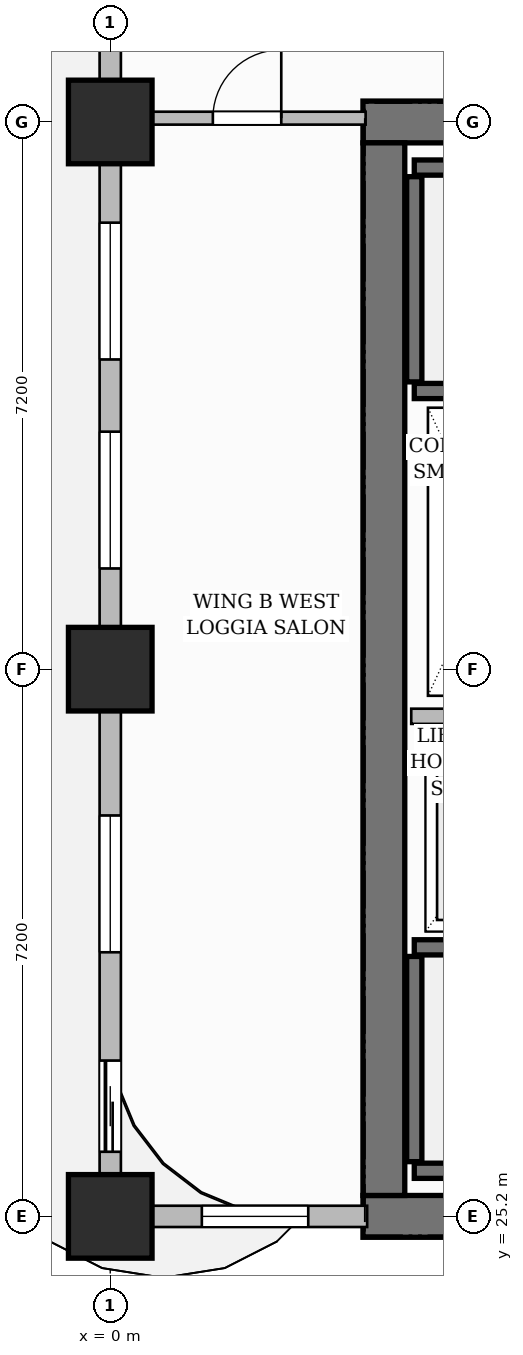
"""IFC4 building model, lengths in metres.
Left out: names, types, materials, properties, quantities, classifications, styles, units other than length and angle.
Written with IfcOpenShell. Run it as: python <this file> out.ifc"""

import sys

from ifc_helpers import new_model, si_unit, direction, frame, frame_2d, origin, origin_2d, place, context, subcontext, project, spatial, rectangle, extrude, source, transform, mapped, element, fill, save


model = new_model("IFC4")
c1 = context("Model", 3, precision=1e-05, world=origin(), true_north=direction((0.0, 1.0)))
c2 = subcontext(c1, "Body", "Model", "MODEL_VIEW")
j1 = project(units=[si_unit("LENGTHUNIT", "METRE"), si_unit("PLANEANGLEUNIT", "RADIAN")], contexts=[c1])
p1 = place(None, origin())
s1 = spatial("IfcSite", under=j1, at=p1, CompositionType="ELEMENT")
p2 = place(p1, origin())
s2 = spatial("IfcBuilding", under=s1, at=p2, CompositionType="ELEMENT")
p3 = place(p2, frame((0.0, 0.0, 73.1)))
s3 = spatial("IfcBuildingStorey", under=s2, at=p3, CompositionType="ELEMENT", Elevation=73.1)
for number, where, z_axis, x_axis in (
    (1, (3.325, 25.2, 0.0), (0.0, 0.0, 1.0), (1.0, 0.0, 0.0)),
    (2, (3.325, 39.6, 0.0), (0.0, 0.0, 1.0), (1.0, 0.0, 0.0)),
):
    element("IfcWall", number, at=place(p3, frame(where, z_axis=z_axis, x_axis=x_axis)), inside=s3, PredefinedType="SHEAR", context=c2, shape_type="SweptSolid", body=[
        extrude(rectangle(XDim=8.35, YDim=0.55, at=frame_2d((4.175, 0.0))), origin(), (0.0, 0.0, 1.0), 3.7),
    ])
p4 = place(p3, frame((3.6, 25.475, 0.0), z_axis=(0.0, 0.0, 1.0), x_axis=(0.0, 1.0, 0.0)))
e3 = element("IfcWall", 3, at=p4, inside=s3, PredefinedType="SHEAR", context=c2, shape_type="SweptSolid", body=[
    extrude(rectangle(XDim=13.85, YDim=0.55, at=frame_2d((6.925, 0.0))), origin(), (0.0, 0.0, 1.0), 3.7),
])
m1 = source(origin(), c2, "Body", "SweptSolid", [
    extrude(rectangle(XDim=1.1, YDim=1.1, at=origin_2d()), origin(), (0.0, 0.0, 1.0), 3.7),
])
for number, where, z_axis, x_axis in (
    (4, (0.0, 25.2, 0.0), (0.0, 0.0, 1.0), (1.0, 0.0, 0.0)),
    (5, (0.0, 32.4, 0.0), (0.0, 0.0, 1.0), (1.0, 0.0, 0.0)),
    (6, (0.0, 39.6, 0.0), (0.0, 0.0, 1.0), (1.0, 0.0, 0.0)),
):
    element("IfcColumn", number, at=place(p3, frame(where, z_axis=z_axis, x_axis=x_axis)), inside=s3, PredefinedType="COLUMN", context=c2, shape_type="MappedRepresentation", body=[
        mapped(m1, transform((0.0, 0.0, 0.0), scale=1.0)),
    ])
p5 = place(p3, frame((4.0, 25.8, 0.0), z_axis=(0.0, 0.0, 1.0), x_axis=(1.0, 0.0, 0.0)))
e7 = element("IfcWall", 7, at=p5, inside=s3, PredefinedType="SHEAR", context=c2, shape_type="SweptSolid", body=[
    extrude(rectangle(XDim=7.1, YDim=0.2, at=frame_2d((3.55, 0.0))), origin(), (0.0, 0.0, 1.0), 3.7),
])
p6 = place(p3, frame((4.0, 25.92, 0.0), z_axis=(0.0, 0.0, 1.0), x_axis=(0.0, 1.0, 0.0)))
e8 = element("IfcWall", 8, at=p6, inside=s3, PredefinedType="SHEAR", context=c2, shape_type="SweptSolid", body=[
    extrude(rectangle(XDim=2.7, YDim=0.2, at=frame_2d((1.35, 0.0))), origin(), (0.0, 0.0, 1.0), 3.7),
])
p7 = place(p3, frame((4.0, 28.74, 0.0), z_axis=(0.0, 0.0, 1.0), x_axis=(1.0, 0.0, 0.0)))
e9 = element("IfcWall", 9, at=p7, inside=s3, PredefinedType="SHEAR", context=c2, shape_type="SweptSolid", body=[
    extrude(rectangle(XDim=7.1, YDim=0.2, at=frame_2d((3.55, 0.0))), origin(), (0.0, 0.0, 1.0), 3.7),
])
p8 = place(p7, frame((5.815, 0.0, 0.0)))
e10 = element("IfcOpeningElement", 10, at=p8, cuts=e9, PredefinedType="OPENING", context=c2, shape_type="SweptSolid", body=[
    extrude(rectangle(XDim=1.05, YDim=2.2, at=frame_2d((0.525, 1.1))), frame((0.0, 0.11, 0.0), z_axis=(0.0, -1.0, 0.0), x_axis=(1.0, 0.0, 0.0)), (0.0, 0.0, 1.0), 0.22),
])
p9 = place(p3, frame((4.0, 39.0, 0.0), z_axis=(0.0, 0.0, 1.0), x_axis=(1.0, 0.0, 0.0)))
e11 = element("IfcWall", 11, at=p9, inside=s3, PredefinedType="SHEAR", context=c2, shape_type="SweptSolid", body=[
    extrude(rectangle(XDim=7.1, YDim=0.2, at=frame_2d((3.55, 0.0))), origin(), (0.0, 0.0, 1.0), 3.7),
])
p10 = place(p3, frame((4.0, 36.18, 0.0), z_axis=(0.0, 0.0, 1.0), x_axis=(0.0, 1.0, 0.0)))
e12 = element("IfcWall", 12, at=p10, inside=s3, PredefinedType="SHEAR", context=c2, shape_type="SweptSolid", body=[
    extrude(rectangle(XDim=2.7, YDim=0.2, at=frame_2d((1.35, 0.0))), origin(), (0.0, 0.0, 1.0), 3.7),
])
p11 = place(p3, frame((4.0, 36.06, 0.0), z_axis=(0.0, 0.0, 1.0), x_axis=(1.0, 0.0, 0.0)))
e13 = element("IfcWall", 13, at=p11, inside=s3, PredefinedType="SHEAR", context=c2, shape_type="SweptSolid", body=[
    extrude(rectangle(XDim=7.1, YDim=0.2, at=frame_2d((3.55, 0.0))), origin(), (0.0, 0.0, 1.0), 3.7),
])
p12 = place(p11, frame((5.815, 0.0, 0.0)))
e14 = element("IfcOpeningElement", 14, at=p12, cuts=e13, PredefinedType="OPENING", context=c2, shape_type="SweptSolid", body=[
    extrude(rectangle(XDim=1.05, YDim=2.2, at=frame_2d((0.525, 1.1))), frame((0.0, 0.11, 0.0), z_axis=(0.0, -1.0, 0.0), x_axis=(1.0, 0.0, 0.0)), (0.0, 0.0, 1.0), 0.22),
])
p13 = place(p3, frame((3.96, 31.78, 0.0), z_axis=(0.0, 0.0, 1.0), x_axis=(1.0, 0.0, 0.0)))
e15 = element("IfcWall", 15, at=p13, inside=s3, PredefinedType="PARTITIONING", context=c2, shape_type="SweptSolid", body=[
    extrude(rectangle(XDim=2.13, YDim=0.2, at=frame_2d((1.065, 0.0))), origin(), (0.0, 0.0, 1.0), 3.45),
])
p14 = place(p3, frame((0.24, 39.65, 0.0), z_axis=(0.0, 0.0, 1.0), x_axis=(1.0, 0.0, 0.0)))
e16 = element("IfcWall", 16, at=p14, inside=s3, PredefinedType="PARTITIONING", context=c2, shape_type="SweptSolid", body=[
    extrude(rectangle(XDim=3.12, YDim=0.17, at=frame_2d((1.56, 0.0))), origin(), (0.0, 0.0, 1.0), 3.45),
])
p15 = place(p14, frame((1.11, 0.0, 0.0)))
e17 = element("IfcOpeningElement", 17, at=p15, cuts=e16, PredefinedType="OPENING", context=c2, shape_type="SweptSolid", body=[
    extrude(rectangle(XDim=0.9, YDim=2.15, at=frame_2d((0.45, 1.075))), frame((0.0, 0.095, 0.0), z_axis=(0.0, -1.0, 0.0), x_axis=(1.0, 0.0, 0.0)), (0.0, 0.0, 1.0), 0.19),
])
p16 = place(p3, frame((0.0, 25.2, 0.0), z_axis=(0.0, 0.0, 1.0), x_axis=(1.0, 0.0, 0.0)))
e18 = element("IfcWall", 18, at=p16, inside=s3, PredefinedType="SOLIDWALL", context=c2, shape_type="SweptSolid", body=[
    extrude(rectangle(XDim=3.38, YDim=0.28, at=frame_2d((1.69, 0.0))), origin(), (0.0, 0.0, 1.0), 3.45),
])
p17 = place(p16, frame((1.205, 0.0, 0.8)))
e19 = element("IfcOpeningElement", 19, at=p17, cuts=e18, PredefinedType="OPENING", context=c2, shape_type="SweptSolid", body=[
    extrude(rectangle(XDim=1.4, YDim=1.85, at=frame_2d((0.7, 0.925))), frame((0.0, 0.15, 0.0), z_axis=(0.0, -1.0, 0.0), x_axis=(1.0, 0.0, 0.0)), (0.0, 0.0, 1.0), 0.3),
])
p18 = place(p3, frame((0.0, 25.25, 0.0), z_axis=(0.0, 0.0, 1.0), x_axis=(0.0, 1.0, 0.0)))
e20 = element("IfcWall", 20, at=p18, inside=s3, PredefinedType="SOLIDWALL", context=c2, shape_type="SweptSolid", body=[
    extrude(rectangle(XDim=21.5, YDim=0.28, at=frame_2d((10.75, 0.0))), origin(), (0.0, 0.0, 1.0), 2.885),
])
p19 = place(p18, frame((18.357, 0.0, 0.0)))
e21 = element("IfcOpeningElement", 21, at=p19, cuts=e20, PredefinedType="OPENING", context=c2, shape_type="SweptSolid", body=[
    extrude(rectangle(XDim=1.2, YDim=2.2, at=frame_2d((0.6, 1.1))), frame((0.0, 0.15, 0.0), z_axis=(0.0, -1.0, 0.0), x_axis=(1.0, 0.0, 0.0)), (0.0, 0.0, 1.0), 0.3),
])
p20 = place(p18, frame((0.8, 0.0, 0.0)))
e22 = element("IfcOpeningElement", 22, at=p20, cuts=e20, PredefinedType="OPENING", context=c2, shape_type="SweptSolid", body=[
    extrude(rectangle(XDim=1.2, YDim=2.2, at=frame_2d((0.6, 1.1))), frame((0.0, 0.15, 0.0), z_axis=(0.0, -1.0, 0.0), x_axis=(1.0, 0.0, 0.0)), (0.0, 0.0, 1.0), 0.3),
])
p21 = place(p18, frame((3.425, 0.0, 0.8)))
e23 = element("IfcOpeningElement", 23, at=p21, cuts=e20, PredefinedType="OPENING", context=c2, shape_type="SweptSolid", body=[
    extrude(rectangle(XDim=1.8, YDim=1.85, at=frame_2d((0.9, 0.925))), frame((0.0, 0.15, 0.0), z_axis=(0.0, -1.0, 0.0), x_axis=(1.0, 0.0, 0.0)), (0.0, 0.0, 1.0), 0.3),
])
p22 = place(p18, frame((8.475, 0.0, 0.8)))
e24 = element("IfcOpeningElement", 24, at=p22, cuts=e20, PredefinedType="OPENING", context=c2, shape_type="SweptSolid", body=[
    extrude(rectangle(XDim=1.8, YDim=1.85, at=frame_2d((0.9, 0.925))), frame((0.0, 0.15, 0.0), z_axis=(0.0, -1.0, 0.0), x_axis=(1.0, 0.0, 0.0)), (0.0, 0.0, 1.0), 0.3),
])
p23 = place(p18, frame((11.225, 0.0, 0.8)))
e25 = element("IfcOpeningElement", 25, at=p23, cuts=e20, PredefinedType="OPENING", context=c2, shape_type="SweptSolid", body=[
    extrude(rectangle(XDim=1.8, YDim=1.85, at=frame_2d((0.9, 0.925))), frame((0.0, 0.15, 0.0), z_axis=(0.0, -1.0, 0.0), x_axis=(1.0, 0.0, 0.0)), (0.0, 0.0, 1.0), 0.3),
])
p24 = place(p18, frame((16.632, 0.0, 0.8)))
e26 = element("IfcOpeningElement", 26, at=p24, cuts=e20, PredefinedType="OPENING", context=c2, shape_type="SweptSolid", body=[
    extrude(rectangle(XDim=1.15, YDim=1.8, at=frame_2d((0.575, 0.9))), frame((0.0, 0.15, 0.0), z_axis=(0.0, -1.0, 0.0), x_axis=(1.0, 0.0, 0.0)), (0.0, 0.0, 1.0), 0.3),
])
m2 = source(origin(), c2, "Body", "SweptSolid", [
    extrude(rectangle(XDim=0.9, YDim=2.15, at=frame_2d((0.45, 1.075))), frame((0.0, 0.025, 0.0), z_axis=(0.0, -1.0, 0.0), x_axis=(1.0, 0.0, 0.0)), (0.0, 0.0, 1.0), 0.05),
])
p25 = place(p15, origin())
e27 = element("IfcDoor", 27, at=p25, inside=s3, OperationType="SINGLE_SWING_RIGHT", PredefinedType="DOOR", context=c2, shape_type="MappedRepresentation", body=[
    mapped(m2, transform((0.0, 0.0, 0.0), scale=1.0)),
])
fill(e17, e27)
m3 = source(origin(), c2, "Body", "SweptSolid", [
    extrude(rectangle(XDim=1.2, YDim=2.2, at=frame_2d((0.6, 1.1))), frame((0.0, 0.025, 0.0), z_axis=(0.0, -1.0, 0.0), x_axis=(1.0, 0.0, 0.0)), (0.0, 0.0, 1.0), 0.05),
])
p26 = place(p20, origin())
e28 = element("IfcDoor", 28, at=p26, inside=s3, OperationType="SLIDING_TO_LEFT", PredefinedType="DOOR", context=c2, shape_type="MappedRepresentation", body=[
    mapped(m3, transform((0.0, 0.0, 0.0), scale=1.0)),
])
fill(e22, e28)
m4 = source(origin(), c2, "Body", "SweptSolid", [
    extrude(rectangle(XDim=1.4, YDim=1.85, at=frame_2d((0.7, 0.925))), frame((0.0, 0.03, 0.0), z_axis=(0.0, -1.0, 0.0), x_axis=(1.0, 0.0, 0.0)), (0.0, 0.0, 1.0), 0.06),
])
p27 = place(p17, origin())
e29 = element("IfcWindow", 29, at=p27, inside=s3, PartitioningType="SINGLE_PANEL", PredefinedType="WINDOW", context=c2, shape_type="MappedRepresentation", body=[
    mapped(m4, transform((0.0, 0.0, 0.0), scale=1.0)),
])
fill(e19, e29)
m5 = source(origin(), c2, "Body", "SweptSolid", [
    extrude(rectangle(XDim=1.8, YDim=1.85, at=frame_2d((0.9, 0.925))), frame((0.0, 0.03, 0.0), z_axis=(0.0, -1.0, 0.0), x_axis=(1.0, 0.0, 0.0)), (0.0, 0.0, 1.0), 0.06),
])
p28 = place(p21, origin())
e30 = element("IfcWindow", 30, at=p28, inside=s3, PartitioningType="DOUBLE_PANEL_VERTICAL", PredefinedType="WINDOW", context=c2, shape_type="MappedRepresentation", body=[
    mapped(m5, transform((0.0, 0.0, 0.0), scale=1.0)),
])
fill(e23, e30)
p29 = place(p22, origin())
e31 = element("IfcWindow", 31, at=p29, inside=s3, PartitioningType="DOUBLE_PANEL_VERTICAL", PredefinedType="WINDOW", context=c2, shape_type="MappedRepresentation", body=[
    mapped(m5, transform((0.0, 0.0, 0.0), scale=1.0)),
])
fill(e24, e31)
p30 = place(p23, origin())
e32 = element("IfcWindow", 32, at=p30, inside=s3, PartitioningType="DOUBLE_PANEL_VERTICAL", PredefinedType="WINDOW", context=c2, shape_type="MappedRepresentation", body=[
    mapped(m5, transform((0.0, 0.0, 0.0), scale=1.0)),
])
fill(e25, e32)
save(model, sys.argv[1])
